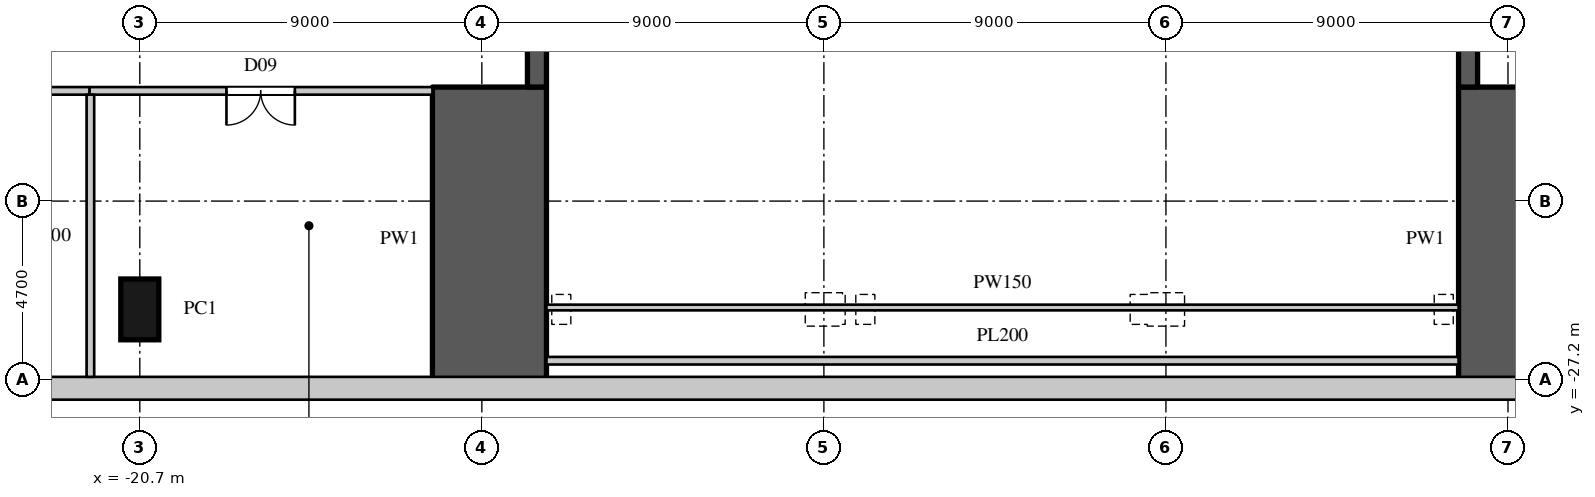
"""IFC4 building model, lengths in metres.
Left out: names, types, materials, properties, quantities, classifications, styles, units other than length and angle.
Written with IfcOpenShell. Run it as: python <this file> out.ifc"""

import sys

from ifc_helpers import new_model, si_unit, direction, frame, frame_2d, origin, origin_2d, place, context, subcontext, project, spatial, rectangle, extrude, element, fill, save


model = new_model("IFC4")
c1 = context("Model", 3, precision=1e-05, world=origin(), true_north=direction((0.0, 1.0)))
c2 = subcontext(c1, "Body", "Model", "MODEL_VIEW")
j1 = project(units=[si_unit("LENGTHUNIT", "METRE"), si_unit("PLANEANGLEUNIT", "RADIAN")], contexts=[c1])
p1 = place(None, origin())
s1 = spatial("IfcSite", under=j1, at=p1, CompositionType="ELEMENT")
p2 = place(p1, origin())
s2 = spatial("IfcBuilding", under=s1, at=p2, CompositionType="ELEMENT")
p3 = place(p2, frame((0.0, 0.0, 29.0)))
s3 = spatial("IfcBuildingStorey", under=s2, at=p3, CompositionType="ELEMENT", Elevation=29.0)
for number, where, z_axis, x_axis in (
    (1, (-11.5, -27.5, 0.0), (0.0, 0.0, 1.0), (0.0, 1.0, 0.0)),
    (2, (15.5, -27.5, 0.0), (0.0, 0.0, 1.0), (0.0, 1.0, 0.0)),
):
    element("IfcWall", number, at=place(p3, frame(where, z_axis=z_axis, x_axis=x_axis)), inside=s3, PredefinedType="SOLIDWALL", context=c2, shape_type="SweptSolid", body=[
        extrude(rectangle(XDim=8.0, YDim=3.0, at=frame_2d((4.0, 0.0))), origin(), (0.0, 0.0, 1.0), 7.0),
    ])
p4 = place(p3, frame((-10.25, -19.5, 0.0), z_axis=(0.0, 0.0, 1.0), x_axis=(0.0, 1.0, 0.0)))
e3 = element("IfcWall", 3, at=p4, inside=s3, PredefinedType="SOLIDWALL", context=c2, shape_type="SweptSolid", body=[
    extrude(rectangle(XDim=39.0, YDim=0.5, at=frame_2d((19.5, 0.0))), origin(), (0.0, 0.0, 1.0), 7.0),
])
p5 = place(p4, frame((18.75, 0.0, 0.0)))
e4 = element("IfcOpeningElement", 4, at=p5, cuts=e3, PredefinedType="OPENING", context=c2, shape_type="SweptSolid", body=[
    extrude(rectangle(XDim=1.5, YDim=2.4, at=frame_2d((0.75, 1.2))), frame((0.0, 0.26, 0.0), z_axis=(0.0, -1.0, 0.0), x_axis=(1.0, 0.0, 0.0)), (0.0, 0.0, 1.0), 0.52),
])
p6 = place(p4, frame((31.95, 0.0, 0.0)))
e5 = element("IfcOpeningElement", 5, at=p6, cuts=e3, PredefinedType="OPENING", context=c2, shape_type="SweptSolid", body=[
    extrude(rectangle(XDim=1.8, YDim=2.4, at=frame_2d((0.9, 1.2))), frame((0.0, 0.26, 0.0), z_axis=(0.0, -1.0, 0.0), x_axis=(1.0, 0.0, 0.0)), (0.0, 0.0, 1.0), 0.52),
])
p7 = place(p4, frame((5.25, 0.0, 0.0)))
e6 = element("IfcOpeningElement", 6, at=p7, cuts=e3, PredefinedType="OPENING", context=c2, shape_type="SweptSolid", body=[
    extrude(rectangle(XDim=1.8, YDim=2.4, at=frame_2d((0.9, 1.2))), frame((0.0, 0.26, 0.0), z_axis=(0.0, -1.0, 0.0), x_axis=(1.0, 0.0, 0.0)), (0.0, 0.0, 1.0), 0.52),
])
p8 = place(p3, frame((14.25, -19.5, 0.0), z_axis=(0.0, 0.0, 1.0), x_axis=(0.0, 1.0, 0.0)))
e7 = element("IfcWall", 7, at=p8, inside=s3, PredefinedType="SOLIDWALL", context=c2, shape_type="SweptSolid", body=[
    extrude(rectangle(XDim=39.0, YDim=0.5, at=frame_2d((19.5, 0.0))), origin(), (0.0, 0.0, 1.0), 7.0),
])
p9 = place(p3, frame((-20.7, -25.35, 0.0), z_axis=(0.0, 0.0, 1.0), x_axis=(1.0, 0.0, 0.0)))
e8 = element("IfcColumn", 8, at=p9, inside=s3, PredefinedType="COLUMN", context=c2, shape_type="SweptSolid", body=[
    extrude(rectangle(XDim=1.0, YDim=1.6, at=origin_2d()), origin(), (0.0, 0.0, 1.0), 7.0),
])
p10 = place(p3, frame((-29.2, -27.425, 0.0), z_axis=(0.0, 0.0, 1.0), x_axis=(1.0, 0.0, 0.0)))
e9 = element("IfcWall", 9, at=p10, inside=s3, PredefinedType="ELEMENTEDWALL", context=c2, shape_type="SweptSolid", body=[
    extrude(rectangle(XDim=53.0, YDim=0.6, at=frame_2d((26.5, 0.0))), origin(), (0.0, 0.0, 1.0), 6.6),
])
p11 = place(p3, frame((-23.689, -19.6, 0.0), z_axis=(0.0, 0.0, 1.0), x_axis=(1.0, 0.0, 0.0)))
e10 = element("IfcWall", 10, at=p11, inside=s3, PredefinedType="PARTITIONING", context=c2, shape_type="SweptSolid", body=[
    extrude(rectangle(XDim=1.669, YDim=0.2, at=frame_2d((0.834, 0.0))), origin(), (0.0, 0.0, 1.0), 6.598),
])
p12 = place(p3, frame((-10.0, -25.3, 0.0), z_axis=(0.0, 0.0, 1.0), x_axis=(1.0, 0.0, 0.0)))
e11 = element("IfcWall", 11, at=p12, inside=s3, PredefinedType="PARTITIONING", context=c2, shape_type="SweptSolid", body=[
    extrude(rectangle(XDim=24.0, YDim=0.15, at=frame_2d((12.0, 0.0))), origin(), (0.0, 0.0, 1.0), 6.598),
])
p13 = place(p3, frame((-22.02, -19.6, 0.0), z_axis=(0.0, 0.0, 1.0), x_axis=(1.0, 0.0, 0.0)))
e12 = element("IfcWall", 12, at=p13, inside=s3, PredefinedType="PARTITIONING", context=c2, shape_type="SweptSolid", body=[
    extrude(rectangle(XDim=9.02, YDim=0.2, at=frame_2d((4.51, 0.0))), origin(), (0.0, 0.0, 1.0), 6.598),
])
p14 = place(p13, frame((3.6, 0.0, 0.0)))
e13 = element("IfcOpeningElement", 13, at=p14, cuts=e12, PredefinedType="OPENING", context=c2, shape_type="SweptSolid", body=[
    extrude(rectangle(XDim=1.8, YDim=2.4, at=frame_2d((0.9, 1.2))), frame((0.0, 0.11, 0.0), z_axis=(0.0, -1.0, 0.0), x_axis=(1.0, 0.0, 0.0)), (0.0, 0.0, 1.0), 0.22),
])
p15 = place(p3, frame((-22.0, -27.125, 0.0), z_axis=(0.0, 0.0, 1.0), x_axis=(0.0, 1.0, 0.0)))
e14 = element("IfcWall", 14, at=p15, inside=s3, PredefinedType="PARTITIONING", context=c2, shape_type="SweptSolid", body=[
    extrude(rectangle(XDim=7.425, YDim=0.2, at=frame_2d((3.712, 0.0))), origin(), (0.0, 0.0, 1.0), 6.598),
])
p16 = place(p3, frame((-10.0, -26.7, 0.0), z_axis=(0.0, 0.0, 1.0), x_axis=(1.0, 0.0, 0.0)))
e15 = element("IfcWall", 15, at=p16, inside=s3, PredefinedType="PARTITIONING", context=c2, shape_type="SweptSolid", body=[
    extrude(rectangle(XDim=24.0, YDim=0.2, at=frame_2d((12.0, 0.0))), origin(), (0.0, 0.0, 1.0), 6.598),
])
p17 = place(p14, origin())
e16 = element("IfcDoor", 16, at=p17, inside=s3, OperationType="DOUBLE_DOOR_SINGLE_SWING", PredefinedType="DOOR", context=c2, shape_type="SweptSolid", body=[
    extrude(rectangle(XDim=1.8, YDim=2.4, at=frame_2d((0.9, 1.2))), frame((0.0, 0.025, 0.0), z_axis=(0.0, -1.0, 0.0), x_axis=(1.0, 0.0, 0.0)), (0.0, 0.0, 1.0), 0.05),
])
fill(e13, e16)
save(model, sys.argv[1])
